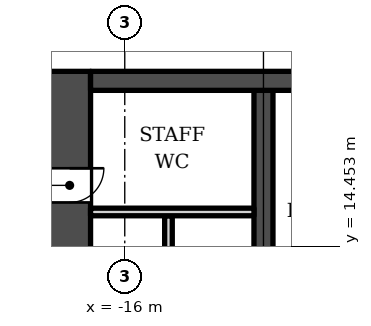
"""IFC4 building model, lengths in metres.
Left out: names, types, materials, properties, quantities, classifications, styles, units other than length and angle.
Written with IfcOpenShell. Run it as: python <this file> out.ifc"""

import sys

from ifc_helpers import new_model, si_unit, direction, frame, frame_2d, origin, place, context, subcontext, project, spatial, rectangle, extrude, element, fill, save


model = new_model("IFC4")
c1 = context("Model", 3, precision=1e-05, world=origin(), true_north=direction((0.0, 1.0)))
c2 = subcontext(c1, "Body", "Model", "MODEL_VIEW")
j1 = project(units=[si_unit("LENGTHUNIT", "METRE"), si_unit("PLANEANGLEUNIT", "RADIAN")], contexts=[c1])
p1 = place(None, origin())
s1 = spatial("IfcSite", under=j1, at=p1, CompositionType="ELEMENT")
p2 = place(p1, origin())
s2 = spatial("IfcBuilding", under=s1, at=p2, CompositionType="ELEMENT")
p3 = place(p2, frame((0.0, 0.0, 20.0)))
s3 = spatial("IfcBuildingStorey", under=s2, at=p3, CompositionType="ELEMENT", Elevation=20.0)
p4 = place(p3, frame((-16.9, 18.802, 0.0), z_axis=(0.0, 0.0, 1.0), x_axis=(1.0, 0.0, 0.0)))
e1 = element("IfcWall", 1, at=p4, inside=s3, PredefinedType="SHEAR", context=c2, shape_type="SweptSolid", body=[
    extrude(rectangle(XDim=33.8, YDim=0.5, at=frame_2d((16.9, 0.0))), origin(), (0.0, 0.0, 1.0), 9.0),
])
p5 = place(p3, frame((-12.35, 5.253, 0.0), z_axis=(0.0, 0.0, 1.0), x_axis=(0.0, 1.0, 0.0)))
e2 = element("IfcWall", 2, at=p5, inside=s3, PredefinedType="SHEAR", context=c2, shape_type="SweptSolid", body=[
    extrude(rectangle(XDim=13.3, YDim=0.5, at=frame_2d((6.65, 0.0))), origin(), (0.0, 0.0, 1.0), 9.0),
])
p6 = place(p3, frame((-17.45, 5.853, 0.0), z_axis=(0.0, 0.0, 1.0), x_axis=(0.0, 1.0, 0.0)))
e3 = element("IfcWall", 3, at=p6, inside=s3, PredefinedType="SHEAR", context=c2, shape_type="SweptSolid", body=[
    extrude(rectangle(XDim=13.2, YDim=1.1, at=frame_2d((6.6, 0.0))), origin(), (0.0, 0.0, 1.0), 9.0),
])
p7 = place(p6, frame((4.1, 0.0, 0.0)))
e4 = element("IfcOpeningElement", 4, at=p7, cuts=e3, PredefinedType="OPENING", context=c2, shape_type="SweptSolid", body=[
    extrude(rectangle(XDim=1.6, YDim=2.1, at=frame_2d((0.8, 1.05))), frame((0.0, 0.56, 0.0), z_axis=(0.0, -1.0, 0.0), x_axis=(1.0, 0.0, 0.0)), (0.0, 0.0, 1.0), 1.12),
])
p8 = place(p6, frame((9.75, 0.0, 0.0)))
e5 = element("IfcOpeningElement", 5, at=p8, cuts=e3, PredefinedType="OPENING", context=c2, shape_type="SweptSolid", body=[
    extrude(rectangle(XDim=0.9, YDim=2.1, at=frame_2d((0.45, 1.05))), frame((0.0, 0.56, 0.0), z_axis=(0.0, -1.0, 0.0), x_axis=(1.0, 0.0, 0.0)), (0.0, 0.0, 1.0), 1.12),
])
p9 = place(p3, frame((-14.85, 12.653, 0.0), z_axis=(0.0, 0.0, 1.0), x_axis=(0.0, 1.0, 0.0)))
e6 = element("IfcWall", 6, at=p9, inside=s3, PredefinedType="SOLIDWALL", context=c2, shape_type="SweptSolid", body=[
    extrude(rectangle(XDim=2.6, YDim=0.2, at=frame_2d((1.3, 0.0))), origin(), (0.0, 0.0, 1.0), 8.55),
])
p10 = place(p3, frame((-16.9, 15.353, 0.0), z_axis=(0.0, 0.0, 1.0), x_axis=(1.0, 0.0, 0.0)))
e7 = element("IfcWall", 7, at=p10, inside=s3, PredefinedType="SOLIDWALL", context=c2, shape_type="SweptSolid", body=[
    extrude(rectangle(XDim=4.3, YDim=0.2, at=frame_2d((2.15, 0.0))), origin(), (0.0, 0.0, 1.0), 8.55),
])
p11 = place(p8, origin())
e8 = element("IfcDoor", 8, at=p11, inside=s3, OperationType="SINGLE_SWING_RIGHT", PredefinedType="DOOR", context=c2, shape_type="SweptSolid", body=[
    extrude(rectangle(XDim=0.9, YDim=2.1, at=frame_2d((0.45, 1.05))), frame((0.0, -0.225, 0.0), z_axis=(0.0, -1.0, 0.0), x_axis=(1.0, 0.0, 0.0)), (0.0, 0.0, 1.0), 0.05),
])
fill(e5, e8)
save(model, sys.argv[1])
